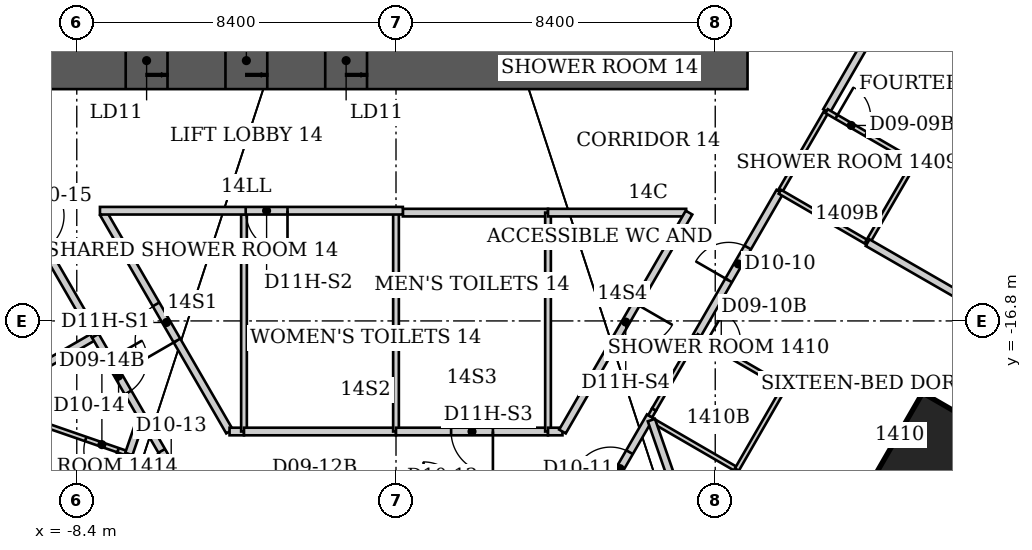
"""IFC4 building model, lengths in metres.
Left out: names, types, materials, properties, quantities, classifications, styles, units other than length and angle.
Written with IfcOpenShell. Run it as: python <this file> out.ifc"""

import sys

from ifc_helpers import new_model, si_unit, direction, frame, frame_2d, origin, origin_2d, place, context, subcontext, project, spatial, rectangle, extrude, element, fill, save


model = new_model("IFC4")
c1 = context("Model", 3, precision=1e-05, world=origin(), true_north=direction((0.0, 1.0)))
c2 = subcontext(c1, "Body", "Model", "MODEL_VIEW")
j1 = project(units=[si_unit("LENGTHUNIT", "METRE"), si_unit("PLANEANGLEUNIT", "RADIAN")], contexts=[c1])
p1 = place(None, origin())
s1 = spatial("IfcSite", under=j1, at=p1, CompositionType="ELEMENT")
p2 = place(p1, origin())
s2 = spatial("IfcBuilding", under=s1, at=p2, CompositionType="ELEMENT")
p3 = place(p2, frame((0.0, 0.0, 61.0)))
s3 = spatial("IfcBuildingStorey", under=s2, at=p3, CompositionType="ELEMENT", Elevation=61.0)
p4 = place(p3, frame((14.297, -20.331, 0.0), z_axis=(-0.02330242081, 0.033124102308, 0.999179558954), x_axis=(0.865853874056, -0.498946587993, 0.036733787066)))
e1 = element("IfcColumn", 1, at=p4, inside=s3, PredefinedType="COLUMN", context=c2, shape_type="SweptSolid", body=[
    extrude(rectangle(XDim=2.4, YDim=2.4, at=origin_2d()), origin(), (0.0, 0.0, 1.0), 3.803),
])
p5 = place(p3, frame((-9.25, -9.95, 0.0), z_axis=(0.0, 0.0, 1.0), x_axis=(1.0, 0.0, 0.0)))
e2 = element("IfcWall", 2, at=p5, inside=s3, PredefinedType="SHEAR", context=c2, shape_type="SweptSolid", body=[
    extrude(rectangle(XDim=18.5, YDim=1.5, at=frame_2d((9.25, 0.0))), origin(), (0.0, 0.0, 1.0), 3.8),
])
p6 = place(p5, frame((2.137, 0.0, 0.0)))
e3 = element("IfcOpeningElement", 3, at=p6, cuts=e2, PredefinedType="OPENING", context=c2, shape_type="SweptSolid", body=[
    extrude(rectangle(XDim=1.1, YDim=2.1, at=frame_2d((0.55, 1.05))), frame((0.0, 0.75, 0.0), z_axis=(0.0, -1.0, 0.0), x_axis=(1.0, 0.0, 0.0)), (0.0, 0.0, 1.0), 1.5),
])
p7 = place(p5, frame((4.762, 0.0, 0.0)))
e4 = element("IfcOpeningElement", 4, at=p7, cuts=e2, PredefinedType="OPENING", context=c2, shape_type="SweptSolid", body=[
    extrude(rectangle(XDim=1.1, YDim=2.1, at=frame_2d((0.55, 1.05))), frame((0.0, 0.75, 0.0), z_axis=(0.0, -1.0, 0.0), x_axis=(1.0, 0.0, 0.0)), (0.0, 0.0, 1.0), 1.5),
])
p8 = place(p5, frame((7.387, 0.0, 0.0)))
e5 = element("IfcOpeningElement", 5, at=p8, cuts=e2, PredefinedType="OPENING", context=c2, shape_type="SweptSolid", body=[
    extrude(rectangle(XDim=1.1, YDim=2.1, at=frame_2d((0.55, 1.05))), frame((0.0, 0.75, 0.0), z_axis=(0.0, -1.0, 0.0), x_axis=(1.0, 0.0, 0.0)), (0.0, 0.0, 1.0), 1.5),
])
p9 = place(p3, frame((-15.176, -21.38, 0.0), z_axis=(0.0, 0.0, 1.0), x_axis=(0.866276837306, 0.49956425127, 0.0)))
e6 = element("IfcWall", 6, at=p9, inside=s3, PredefinedType="PARTITIONING", context=c2, shape_type="SweptSolid", body=[
    extrude(rectangle(XDim=8.373, YDim=0.2, at=frame_2d((4.186, 0.0))), origin(), (0.0, 0.0, 1.0), 3.64),
])
p10 = place(p3, frame((-11.06, -11.74, 0.0), z_axis=(0.0, 0.0, 1.0), x_axis=(0.50043073037, -0.865776578628, 0.0)))
e7 = element("IfcWall", 7, at=p10, inside=s3, PredefinedType="PARTITIONING", context=c2, shape_type="SweptSolid", body=[
    extrude(rectangle(XDim=6.295, YDim=0.2, at=frame_2d((3.147, 0.0))), origin(), (0.0, 0.0, 1.0), 3.64),
])
p11 = place(p10, frame((2.647, 0.0, 0.0)))
e8 = element("IfcOpeningElement", 8, at=p11, cuts=e7, PredefinedType="OPENING", context=c2, shape_type="SweptSolid", body=[
    extrude(rectangle(XDim=1.0, YDim=2.13, at=frame_2d((0.5, 1.065))), frame((0.0, 0.1, 0.0), z_axis=(0.0, -1.0, 0.0), x_axis=(1.0, 0.0, 0.0)), (0.0, 0.0, 1.0), 0.2),
])
p12 = place(p3, frame((-7.91, -17.19, 0.0), z_axis=(0.0, 0.0, 1.0), x_axis=(0.498748634132, -0.866746675766, 0.0)))
e9 = element("IfcWall", 9, at=p12, inside=s3, PredefinedType="PARTITIONING", context=c2, shape_type="SweptSolid", body=[
    extrude(rectangle(XDim=2.446, YDim=0.2, at=frame_2d((1.223, 0.0))), origin(), (0.0, 0.0, 1.0), 3.64),
])
p13 = place(p12, frame((0.723, 0.0, 0.0)))
e10 = element("IfcOpeningElement", 10, at=p13, cuts=e9, PredefinedType="OPENING", context=c2, shape_type="SweptSolid", body=[
    extrude(rectangle(XDim=1.0, YDim=2.13, at=frame_2d((0.5, 1.065))), frame((0.0, 0.1, 0.0), z_axis=(0.0, -1.0, 0.0), x_axis=(1.0, 0.0, 0.0)), (0.0, 0.0, 1.0), 0.2),
])
p14 = place(p3, frame((-7.82, -22.57, 0.0), z_axis=(0.0, 0.0, 1.0), x_axis=(0.328693963496, 0.944436487203, 0.0)))
e11 = element("IfcWall", 11, at=p14, inside=s3, PredefinedType="PARTITIONING", context=c2, shape_type="SweptSolid", body=[
    extrude(rectangle(XDim=2.404, YDim=0.12, at=frame_2d((1.202, 0.0))), origin(), (0.0, 0.0, 1.0), 3.64),
])
p15 = place(p3, frame((-7.03, -20.3, 0.0), z_axis=(0.0, 0.0, 1.0), x_axis=(-0.94515546045, 0.326620813149, 0.0)))
e12 = element("IfcWall", 12, at=p15, inside=s3, PredefinedType="PARTITIONING", context=c2, shape_type="SweptSolid", body=[
    extrude(rectangle(XDim=2.603, YDim=0.12, at=frame_2d((1.301, 0.0))), origin(), (0.0, 0.0, 1.0), 3.64),
])
p16 = place(p15, frame((0.3, 0.0, 0.0)))
e13 = element("IfcOpeningElement", 13, at=p16, cuts=e12, PredefinedType="OPENING", context=c2, shape_type="SweptSolid", body=[
    extrude(rectangle(XDim=0.9, YDim=2.03, at=frame_2d((0.45, 1.015))), frame((0.0, 0.06, 0.0), z_axis=(0.0, -1.0, 0.0), x_axis=(1.0, 0.0, 0.0)), (0.0, 0.0, 1.0), 0.12),
])
p17 = place(p3, frame((-7.03, -20.3, 0.0), z_axis=(0.0, 0.0, 1.0), x_axis=(0.324737408014, 0.94580421644, 0.0)))
e14 = element("IfcWall", 14, at=p17, inside=s3, PredefinedType="PARTITIONING", context=c2, shape_type="SweptSolid", body=[
    extrude(rectangle(XDim=0.937, YDim=0.2, at=frame_2d((0.468, 0.0))), origin(), (0.0, 0.0, 1.0), 3.64),
])
p18 = place(p3, frame((-6.69, -19.31, 0.0), z_axis=(0.0, 0.0, 1.0), x_axis=(0.499963722229, -0.866046347752, 0.0)))
e15 = element("IfcWall", 15, at=p18, inside=s3, PredefinedType="PARTITIONING", context=c2, shape_type="SweptSolid", body=[
    extrude(rectangle(XDim=2.54, YDim=0.2, at=frame_2d((1.27, 0.0))), origin(), (0.0, 0.0, 1.0), 3.64),
])
p19 = place(p18, frame((1.05, 0.0, 0.0)))
e16 = element("IfcOpeningElement", 16, at=p19, cuts=e15, PredefinedType="OPENING", context=c2, shape_type="SweptSolid", body=[
    extrude(rectangle(XDim=1.0, YDim=2.13, at=frame_2d((0.5, 1.065))), frame((0.0, 0.1, 0.0), z_axis=(0.0, -1.0, 0.0), x_axis=(1.0, 0.0, 0.0)), (0.0, 0.0, 1.0), 0.2),
])
p20 = place(p3, frame((-4.38, -19.71, 0.0), z_axis=(0.0, 0.0, 1.0), x_axis=(-0.500523653757, 0.865722860984, 0.0)))
e17 = element("IfcWall", 17, at=p20, inside=s3, PredefinedType="PARTITIONING", context=c2, shape_type="SweptSolid", body=[
    extrude(rectangle(XDim=6.628, YDim=0.2, at=frame_2d((3.314, 0.0))), origin(), (0.0, 0.0, 1.0), 3.64),
])
p21 = place(p20, frame((2.764, 0.0, 0.0)))
e18 = element("IfcOpeningElement", 18, at=p21, cuts=e17, PredefinedType="OPENING", context=c2, shape_type="SweptSolid", body=[
    extrude(rectangle(XDim=1.1, YDim=2.2, at=frame_2d((0.55, 1.1))), frame((0.0, 0.1, 0.0), z_axis=(0.0, -1.0, 0.0), x_axis=(1.0, 0.0, 0.0)), (0.0, 0.0, 1.0), 0.2),
])
p22 = place(p3, frame((-4.0, -19.71, 0.0), z_axis=(0.0, 0.0, 1.0), x_axis=(-1.0, 0.0, 0.0)))
e19 = element("IfcWall", 19, at=p22, inside=s3, PredefinedType="PARTITIONING", context=c2, shape_type="SweptSolid", body=[
    extrude(rectangle(XDim=0.38, YDim=0.2, at=frame_2d((0.19, 0.0))), origin(), (0.0, 0.0, 1.0), 3.64),
])
p23 = place(p3, frame((-4.0, -14.0, 0.0), z_axis=(0.0, 0.0, 1.0), x_axis=(0.0, -1.0, 0.0)))
e20 = element("IfcWall", 20, at=p23, inside=s3, PredefinedType="PARTITIONING", context=c2, shape_type="SweptSolid", body=[
    extrude(rectangle(XDim=5.71, YDim=0.15, at=frame_2d((2.855, 0.0))), origin(), (0.0, 0.0, 1.0), 3.64),
])
p24 = place(p3, frame((0.0, -19.71, 0.0), z_axis=(0.0, 0.0, 1.0), x_axis=(-1.0, 0.0, 0.0)))
e21 = element("IfcWall", 21, at=p24, inside=s3, PredefinedType="PARTITIONING", context=c2, shape_type="SweptSolid", body=[
    extrude(rectangle(XDim=4.0, YDim=0.2, at=frame_2d((2.0, 0.0))), origin(), (0.0, 0.0, 1.0), 3.64),
])
p25 = place(p3, frame((0.0, -13.95, 0.0), z_axis=(0.0, 0.0, 1.0), x_axis=(0.0, -1.0, 0.0)))
e22 = element("IfcWall", 22, at=p25, inside=s3, PredefinedType="PARTITIONING", context=c2, shape_type="SweptSolid", body=[
    extrude(rectangle(XDim=5.76, YDim=0.15, at=frame_2d((2.88, 0.0))), origin(), (0.0, 0.0, 1.0), 2.86),
])
p26 = place(p3, frame((0.18, -13.95, 0.0), z_axis=(0.0, 0.0, 1.0), x_axis=(1.0, 0.0, 0.0)))
e23 = element("IfcWall", 23, at=p26, inside=s3, PredefinedType="PARTITIONING", context=c2, shape_type="SweptSolid", body=[
    extrude(rectangle(XDim=3.82, YDim=0.2, at=frame_2d((1.91, 0.0))), origin(), (0.0, 0.0, 1.0), 3.64),
])
p27 = place(p3, frame((0.18, -13.9, 0.0), z_axis=(0.0, 0.0, 1.0), x_axis=(-1.0, 0.0, 0.0)))
e24 = element("IfcWall", 24, at=p27, inside=s3, PredefinedType="PARTITIONING", context=c2, shape_type="SweptSolid", body=[
    extrude(rectangle(XDim=7.97, YDim=0.2, at=frame_2d((3.985, 0.0))), origin(), (0.0, 0.0, 1.0), 3.64),
])
p28 = place(p27, frame((3.035, 0.0, 0.0)))
e25 = element("IfcOpeningElement", 25, at=p28, cuts=e24, PredefinedType="OPENING", context=c2, shape_type="SweptSolid", body=[
    extrude(rectangle(XDim=1.1, YDim=2.2, at=frame_2d((0.55, 1.1))), frame((0.0, 0.1, 0.0), z_axis=(0.0, -1.0, 0.0), x_axis=(1.0, 0.0, 0.0)), (0.0, 0.0, 1.0), 0.2),
])
p29 = place(p3, frame((4.0, -19.71, 0.0), z_axis=(0.0, 0.0, 1.0), x_axis=(-1.0, 0.0, 0.0)))
e26 = element("IfcWall", 26, at=p29, inside=s3, PredefinedType="PARTITIONING", context=c2, shape_type="SweptSolid", body=[
    extrude(rectangle(XDim=4.0, YDim=0.2, at=frame_2d((2.0, 0.0))), origin(), (0.0, 0.0, 1.0), 3.64),
])
p30 = place(p29, frame((1.45, 0.0, 0.0)))
e27 = element("IfcOpeningElement", 27, at=p30, cuts=e26, PredefinedType="OPENING", context=c2, shape_type="SweptSolid", body=[
    extrude(rectangle(XDim=1.1, YDim=2.2, at=frame_2d((0.55, 1.1))), frame((0.0, 0.1, 0.0), z_axis=(0.0, -1.0, 0.0), x_axis=(1.0, 0.0, 0.0)), (0.0, 0.0, 1.0), 0.2),
])
p31 = place(p3, frame((4.0, -13.95, 0.0), z_axis=(0.0, 0.0, 1.0), x_axis=(0.0, -1.0, 0.0)))
e28 = element("IfcWall", 28, at=p31, inside=s3, PredefinedType="PARTITIONING", context=c2, shape_type="SweptSolid", body=[
    extrude(rectangle(XDim=5.76, YDim=0.15, at=frame_2d((2.88, 0.0))), origin(), (0.0, 0.0, 1.0), 3.64),
])
p32 = place(p3, frame((4.0, -13.95, 0.0), z_axis=(0.0, 0.0, 1.0), x_axis=(1.0, 0.0, 0.0)))
e29 = element("IfcWall", 29, at=p32, inside=s3, PredefinedType="PARTITIONING", context=c2, shape_type="SweptSolid", body=[
    extrude(rectangle(XDim=3.635, YDim=0.2, at=frame_2d((1.817, 0.0))), origin(), (0.0, 0.0, 1.0), 3.64),
])
p33 = place(p3, frame((4.38, -19.71, 0.0), z_axis=(0.0, 0.0, 1.0), x_axis=(-1.0, 0.0, 0.0)))
e30 = element("IfcWall", 30, at=p33, inside=s3, PredefinedType="PARTITIONING", context=c2, shape_type="SweptSolid", body=[
    extrude(rectangle(XDim=0.38, YDim=0.2, at=frame_2d((0.19, 0.0))), origin(), (0.0, 0.0, 1.0), 3.64),
])
p34 = place(p3, frame((5.42, -21.51, 0.0), z_axis=(0.0, 0.0, 1.0), x_axis=(0.499963722229, 0.866046347752, 0.0)))
e31 = element("IfcWall", 31, at=p34, inside=s3, PredefinedType="PARTITIONING", context=c2, shape_type="SweptSolid", body=[
    extrude(rectangle(XDim=2.54, YDim=0.2, at=frame_2d((1.27, 0.0))), origin(), (0.0, 0.0, 1.0), 3.64),
])
p35 = place(p34, frame((0.45, 0.0, 0.0)))
e32 = element("IfcOpeningElement", 32, at=p35, cuts=e31, PredefinedType="OPENING", context=c2, shape_type="SweptSolid", body=[
    extrude(rectangle(XDim=1.0, YDim=2.13, at=frame_2d((0.5, 1.065))), frame((0.0, 0.1, 0.0), z_axis=(0.0, -1.0, 0.0), x_axis=(1.0, 0.0, 0.0)), (0.0, 0.0, 1.0), 0.2),
])
p36 = place(p3, frame((6.69, -19.31, 0.0), z_axis=(0.0, 0.0, 1.0), x_axis=(0.486146223419, 0.873877479659, 0.0)))
e33 = element("IfcWall", 33, at=p36, inside=s3, PredefinedType="PARTITIONING", context=c2, shape_type="SweptSolid", body=[
    extrude(rectangle(XDim=0.206, YDim=0.12, at=frame_2d((0.103, 0.0))), origin(), (0.0, 0.0, 1.0), 3.64),
])
p37 = place(p3, frame((6.79, -19.13, 0.0), z_axis=(0.0, 0.0, 1.0), x_axis=(0.501890014208, 0.864931450254, 0.0)))
e34 = element("IfcWall", 34, at=p37, inside=s3, PredefinedType="PARTITIONING", context=c2, shape_type="SweptSolid", body=[
    extrude(rectangle(XDim=2.231, YDim=0.12, at=frame_2d((1.116, 0.0))), origin(), (0.0, 0.0, 1.0), 3.64),
])
p38 = place(p3, frame((6.812, -19.458, 0.0), z_axis=(0.0, 0.0, 1.0), x_axis=(0.864905443987, -0.501934829397, 0.0)))
e35 = element("IfcWall", 35, at=p38, inside=s3, PredefinedType="PARTITIONING", context=c2, shape_type="SweptSolid", body=[
    extrude(rectangle(XDim=2.495, YDim=0.12, at=frame_2d((1.247, 0.0))), origin(), (0.0, 0.0, 1.0), 3.64),
])
p39 = place(p3, frame((7.71, -13.95, 0.0), z_axis=(0.0, 0.0, 1.0), x_axis=(-0.500511113963, -0.865730110831, 0.0)))
e36 = element("IfcWall", 36, at=p39, inside=s3, PredefinedType="PARTITIONING", context=c2, shape_type="SweptSolid", body=[
    extrude(rectangle(XDim=6.653, YDim=0.2, at=frame_2d((3.327, 0.0))), origin(), (0.0, 0.0, 1.0), 3.64),
])
p40 = place(p39, frame((2.777, 0.0, 0.0)))
e37 = element("IfcOpeningElement", 37, at=p40, cuts=e36, PredefinedType="OPENING", context=c2, shape_type="SweptSolid", body=[
    extrude(rectangle(XDim=1.1, YDim=2.2, at=frame_2d((0.55, 1.1))), frame((0.0, 0.1, 0.0), z_axis=(0.0, -1.0, 0.0), x_axis=(1.0, 0.0, 0.0)), (0.0, 0.0, 1.0), 0.2),
])
p41 = place(p3, frame((7.908, -17.199, 0.0), z_axis=(0.0, 0.0, 1.0), x_axis=(0.49974333473, 0.866173538844, 0.0)))
e38 = element("IfcWall", 38, at=p41, inside=s3, PredefinedType="PARTITIONING", context=c2, shape_type="SweptSolid", body=[
    extrude(rectangle(XDim=4.386, YDim=0.2, at=frame_2d((2.193, 0.0))), origin(), (0.0, 0.0, 1.0), 3.64),
])
p42 = place(p41, frame((1.693, 0.0, 0.0)))
e39 = element("IfcOpeningElement", 39, at=p42, cuts=e38, PredefinedType="OPENING", context=c2, shape_type="SweptSolid", body=[
    extrude(rectangle(XDim=1.0, YDim=2.13, at=frame_2d((0.5, 1.065))), frame((0.0, 0.1, 0.0), z_axis=(0.0, -1.0, 0.0), x_axis=(1.0, 0.0, 0.0)), (0.0, 0.0, 1.0), 0.2),
])
p43 = place(p3, frame((8.97, -20.71, 0.0), z_axis=(0.0, 0.0, 1.0), x_axis=(0.499159685399, 0.866510016372, 0.0)))
e40 = element("IfcWall", 40, at=p43, inside=s3, PredefinedType="PARTITIONING", context=c2, shape_type="SweptSolid", body=[
    extrude(rectangle(XDim=2.504, YDim=0.12, at=frame_2d((1.252, 0.0))), origin(), (0.0, 0.0, 1.0), 3.64),
])
p44 = place(p3, frame((10.1, -13.4, 0.0), z_axis=(0.0, 0.0, 1.0), x_axis=(0.501856726365, 0.86495076519, 0.0)))
e41 = element("IfcWall", 41, at=p44, inside=s3, PredefinedType="PARTITIONING", context=c2, shape_type="SweptSolid", body=[
    extrude(rectangle(XDim=2.451, YDim=0.12, at=frame_2d((1.226, 0.0))), origin(), (0.0, 0.0, 1.0), 3.64),
])
p45 = place(p3, frame((10.1, -13.4, 0.0), z_axis=(0.0, 0.0, 1.0), x_axis=(0.864966903181, -0.501828911485, 0.0)))
e42 = element("IfcWall", 42, at=p45, inside=s3, PredefinedType="PARTITIONING", context=c2, shape_type="SweptSolid", body=[
    extrude(rectangle(XDim=2.67, YDim=0.12, at=frame_2d((1.335, 0.0))), origin(), (0.0, 0.0, 1.0), 3.64),
])
p46 = place(p3, frame((10.2, -29.442, 0.0), z_axis=(0.0, 0.0, 1.0), x_axis=(-0.327758043269, 0.944761697505, 0.0)))
e43 = element("IfcWall", 43, at=p46, inside=s3, PredefinedType="PARTITIONING", context=c2, shape_type="SweptSolid", body=[
    extrude(rectangle(XDim=10.618, YDim=0.2, at=frame_2d((5.309, 0.0))), origin(), (0.0, 0.0, 1.0), 3.64),
])
p47 = place(p3, frame((10.22, -18.54, 0.0), z_axis=(0.0, 0.0, 1.0), x_axis=(-0.86498992408, 0.501789229896, 0.0)))
e44 = element("IfcWall", 44, at=p47, inside=s3, PredefinedType="PARTITIONING", context=c2, shape_type="SweptSolid", body=[
    extrude(rectangle(XDim=2.671, YDim=0.12, at=frame_2d((1.335, 0.0))), origin(), (0.0, 0.0, 1.0), 3.64),
])
p48 = place(p47, frame((1.47, 0.0, 0.0)))
e45 = element("IfcOpeningElement", 45, at=p48, cuts=e44, PredefinedType="OPENING", context=c2, shape_type="SweptSolid", body=[
    extrude(rectangle(XDim=0.9, YDim=2.03, at=frame_2d((0.45, 1.015))), frame((0.0, 0.06, 0.0), z_axis=(0.0, -1.0, 0.0), x_axis=(1.0, 0.0, 0.0)), (0.0, 0.0, 1.0), 0.12),
])
p49 = place(p3, frame((11.328, -11.279, 0.0), z_axis=(0.0, 0.0, 1.0), x_axis=(0.499554430625, 0.866282500598, 0.0)))
e46 = element("IfcWall", 46, at=p49, inside=s3, PredefinedType="PARTITIONING", context=c2, shape_type="SweptSolid", body=[
    extrude(rectangle(XDim=6.29, YDim=0.2, at=frame_2d((3.145, 0.0))), origin(), (0.0, 0.0, 1.0), 3.64),
])
p50 = place(p49, frame((2.645, 0.0, 0.0)))
e47 = element("IfcOpeningElement", 47, at=p50, cuts=e46, PredefinedType="OPENING", context=c2, shape_type="SweptSolid", body=[
    extrude(rectangle(XDim=1.0, YDim=2.13, at=frame_2d((0.5, 1.065))), frame((0.0, 0.1, 0.0), z_axis=(0.0, -1.0, 0.0), x_axis=(1.0, 0.0, 0.0)), (0.0, 0.0, 1.0), 0.2),
])
p51 = place(p3, frame((12.41, -14.74, 0.0), z_axis=(0.0, 0.0, 1.0), x_axis=(0.501813488763, 0.864975850817, 0.0)))
e48 = element("IfcWall", 48, at=p51, inside=s3, PredefinedType="PARTITIONING", context=c2, shape_type="SweptSolid", body=[
    extrude(rectangle(XDim=2.451, YDim=0.12, at=frame_2d((1.226, 0.0))), origin(), (0.0, 0.0, 1.0), 3.64),
])
p52 = place(p3, frame((13.64, -12.62, 0.0), z_axis=(0.0, 0.0, 1.0), x_axis=(-0.864966903181, 0.501828911485, 0.0)))
e49 = element("IfcWall", 49, at=p52, inside=s3, PredefinedType="PARTITIONING", context=c2, shape_type="SweptSolid", body=[
    extrude(rectangle(XDim=2.67, YDim=0.12, at=frame_2d((1.335, 0.0))), origin(), (0.0, 0.0, 1.0), 3.038),
])
p53 = place(p52, frame((1.47, 0.0, 0.0)))
e50 = element("IfcOpeningElement", 50, at=p53, cuts=e49, PredefinedType="OPENING", context=c2, shape_type="SweptSolid", body=[
    extrude(rectangle(XDim=0.9, YDim=2.03, at=frame_2d((0.45, 1.015))), frame((0.0, 0.06, 0.0), z_axis=(0.0, -1.0, 0.0), x_axis=(1.0, 0.0, 0.0)), (0.0, 0.0, 1.0), 0.12),
])
p54 = place(p3, frame((17.356, -17.59, 0.0), z_axis=(0.0, 0.0, 1.0), x_axis=(-0.866442508333, 0.499276856818, 0.0)))
e51 = element("IfcWall", 51, at=p54, inside=s3, PredefinedType="PARTITIONING", context=c2, shape_type="SweptSolid", body=[
    extrude(rectangle(XDim=5.708, YDim=0.2, at=frame_2d((2.854, 0.0))), origin(), (0.0, 0.0, 1.0), 3.64),
])
p55 = place(p53, origin())
e52 = element("IfcDoor", 52, at=p55, inside=s3, OperationType="SINGLE_SWING_RIGHT", PredefinedType="DOOR", context=c2, shape_type="SweptSolid", body=[
    extrude(rectangle(XDim=0.9, YDim=2.03, at=frame_2d((0.45, 1.015))), frame((0.0, 0.025, 0.0), z_axis=(0.0, -1.0, 0.0), x_axis=(1.0, 0.0, 0.0)), (0.0, 0.0, 1.0), 0.05),
])
fill(e50, e52)
p56 = place(p42, origin())
e53 = element("IfcDoor", 53, at=p56, inside=s3, OperationType="SINGLE_SWING_LEFT", PredefinedType="DOOR", context=c2, shape_type="SweptSolid", body=[
    extrude(rectangle(XDim=1.0, YDim=2.13, at=frame_2d((0.5, 1.065))), frame((0.0, 0.025, 0.0), z_axis=(0.0, -1.0, 0.0), x_axis=(1.0, 0.0, 0.0)), (0.0, 0.0, 1.0), 0.05),
])
fill(e39, e53)
p57 = place(p48, origin())
e54 = element("IfcDoor", 54, at=p57, inside=s3, OperationType="SINGLE_SWING_RIGHT", PredefinedType="DOOR", context=c2, shape_type="SweptSolid", body=[
    extrude(rectangle(XDim=0.9, YDim=2.03, at=frame_2d((0.45, 1.015))), frame((0.0, 0.025, 0.0), z_axis=(0.0, -1.0, 0.0), x_axis=(1.0, 0.0, 0.0)), (0.0, 0.0, 1.0), 0.05),
])
fill(e45, e54)
p58 = place(p35, origin())
e55 = element("IfcDoor", 55, at=p58, inside=s3, OperationType="SINGLE_SWING_LEFT", PredefinedType="DOOR", context=c2, shape_type="SweptSolid", body=[
    extrude(rectangle(XDim=1.0, YDim=2.13, at=frame_2d((0.5, 1.065))), frame((0.0, 0.025, 0.0), z_axis=(0.0, -1.0, 0.0), x_axis=(1.0, 0.0, 0.0)), (0.0, 0.0, 1.0), 0.05),
])
fill(e32, e55)
p59 = place(p19, origin())
e56 = element("IfcDoor", 56, at=p59, inside=s3, OperationType="SINGLE_SWING_RIGHT", PredefinedType="DOOR", context=c2, shape_type="SweptSolid", body=[
    extrude(rectangle(XDim=1.0, YDim=2.13, at=frame_2d((0.5, 1.065))), frame((0.0, 0.025, 0.0), z_axis=(0.0, -1.0, 0.0), x_axis=(1.0, 0.0, 0.0)), (0.0, 0.0, 1.0), 0.05),
])
fill(e16, e56)
p60 = place(p13, origin())
e57 = element("IfcDoor", 57, at=p60, inside=s3, OperationType="SINGLE_SWING_LEFT", PredefinedType="DOOR", context=c2, shape_type="SweptSolid", body=[
    extrude(rectangle(XDim=1.0, YDim=2.13, at=frame_2d((0.5, 1.065))), frame((0.0, 0.025, 0.0), z_axis=(0.0, -1.0, 0.0), x_axis=(1.0, 0.0, 0.0)), (0.0, 0.0, 1.0), 0.05),
])
fill(e10, e57)
p61 = place(p16, origin())
e58 = element("IfcDoor", 58, at=p61, inside=s3, OperationType="SINGLE_SWING_LEFT", PredefinedType="DOOR", context=c2, shape_type="SweptSolid", body=[
    extrude(rectangle(XDim=0.9, YDim=2.03, at=frame_2d((0.45, 1.015))), frame((0.0, 0.025, 0.0), z_axis=(0.0, -1.0, 0.0), x_axis=(1.0, 0.0, 0.0)), (0.0, 0.0, 1.0), 0.05),
])
fill(e13, e58)
p62 = place(p21, origin())
e59 = element("IfcDoor", 59, at=p62, inside=s3, OperationType="SINGLE_SWING_LEFT", PredefinedType="DOOR", context=c2, shape_type="SweptSolid", body=[
    extrude(rectangle(XDim=1.1, YDim=2.2, at=frame_2d((0.55, 1.1))), frame((0.0, 0.025, 0.0), z_axis=(0.0, -1.0, 0.0), x_axis=(1.0, 0.0, 0.0)), (0.0, 0.0, 1.0), 0.05),
])
fill(e18, e59)
p63 = place(p28, origin())
e60 = element("IfcDoor", 60, at=p63, inside=s3, OperationType="SINGLE_SWING_LEFT", PredefinedType="DOOR", context=c2, shape_type="SweptSolid", body=[
    extrude(rectangle(XDim=1.1, YDim=2.2, at=frame_2d((0.55, 1.1))), frame((0.0, 0.025, 0.0), z_axis=(0.0, -1.0, 0.0), x_axis=(1.0, 0.0, 0.0)), (0.0, 0.0, 1.0), 0.05),
])
fill(e25, e60)
p64 = place(p30, origin())
e61 = element("IfcDoor", 61, at=p64, inside=s3, OperationType="SINGLE_SWING_LEFT", PredefinedType="DOOR", context=c2, shape_type="SweptSolid", body=[
    extrude(rectangle(XDim=1.1, YDim=2.2, at=frame_2d((0.55, 1.1))), frame((0.0, 0.025, 0.0), z_axis=(0.0, -1.0, 0.0), x_axis=(1.0, 0.0, 0.0)), (0.0, 0.0, 1.0), 0.05),
])
fill(e27, e61)
p65 = place(p40, origin())
e62 = element("IfcDoor", 62, at=p65, inside=s3, OperationType="SINGLE_SWING_LEFT", PredefinedType="DOOR", context=c2, shape_type="SweptSolid", body=[
    extrude(rectangle(XDim=1.1, YDim=2.2, at=frame_2d((0.55, 1.1))), frame((0.0, 0.025, 0.0), z_axis=(0.0, -1.0, 0.0), x_axis=(1.0, 0.0, 0.0)), (0.0, 0.0, 1.0), 0.05),
])
fill(e37, e62)
p66 = place(p6, origin())
e63 = element("IfcDoor", 63, at=p66, inside=s3, OperationType="DOUBLE_DOOR_SLIDING", PredefinedType="DOOR", context=c2, shape_type="SweptSolid", body=[
    extrude(rectangle(XDim=1.1, YDim=2.1, at=frame_2d((0.55, 1.05))), frame((0.0, 0.025, 0.0), z_axis=(0.0, -1.0, 0.0), x_axis=(1.0, 0.0, 0.0)), (0.0, 0.0, 1.0), 0.05),
])
fill(e3, e63)
p67 = place(p7, origin())
e64 = element("IfcDoor", 64, at=p67, inside=s3, OperationType="DOUBLE_DOOR_SLIDING", PredefinedType="DOOR", context=c2, shape_type="SweptSolid", body=[
    extrude(rectangle(XDim=1.1, YDim=2.1, at=frame_2d((0.55, 1.05))), frame((0.0, 0.025, 0.0), z_axis=(0.0, -1.0, 0.0), x_axis=(1.0, 0.0, 0.0)), (0.0, 0.0, 1.0), 0.05),
])
fill(e4, e64)
p68 = place(p8, origin())
e65 = element("IfcDoor", 65, at=p68, inside=s3, OperationType="DOUBLE_DOOR_SLIDING", PredefinedType="DOOR", context=c2, shape_type="SweptSolid", body=[
    extrude(rectangle(XDim=1.1, YDim=2.1, at=frame_2d((0.55, 1.05))), frame((0.0, 0.025, 0.0), z_axis=(0.0, -1.0, 0.0), x_axis=(1.0, 0.0, 0.0)), (0.0, 0.0, 1.0), 0.05),
])
fill(e5, e65)
save(model, sys.argv[1])
